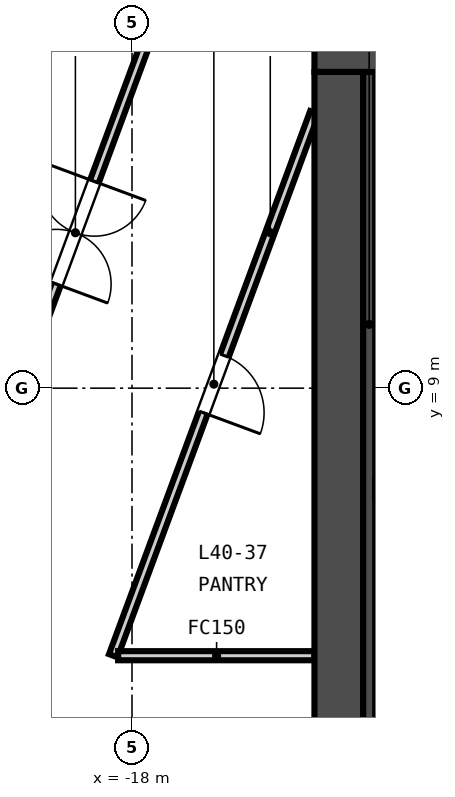
"""IFC4 building model, lengths in metres.
Left out: names, types, materials, properties, quantities, classifications, styles, units other than length and angle.
Written with IfcOpenShell. Run it as: python <this file> out.ifc"""

import sys

from ifc_helpers import new_model, si_unit, direction, frame, frame_2d, origin, place, context, subcontext, project, spatial, rectangle, extrude, element, fill, save


model = new_model("IFC4")
c1 = context("Model", 3, precision=1e-05, world=origin(), true_north=direction((0.0, 1.0)))
c2 = subcontext(c1, "Body", "Model", "MODEL_VIEW")
j1 = project(units=[si_unit("LENGTHUNIT", "METRE"), si_unit("PLANEANGLEUNIT", "RADIAN")], contexts=[c1])
p1 = place(None, origin())
s1 = spatial("IfcSite", under=j1, at=p1, CompositionType="ELEMENT")
p2 = place(p1, origin())
s2 = spatial("IfcBuilding", under=s1, at=p2, CompositionType="ELEMENT")
p3 = place(p2, frame((0.0, 0.0, 162.65)))
s3 = spatial("IfcBuildingStorey", under=s2, at=p3, CompositionType="ELEMENT", Elevation=162.65)
p4 = place(p3, frame((-15.0, 14.6, -0.15), z_axis=(0.0, 0.0, 1.0), x_axis=(1.0, 0.0, 0.0)))
e1 = element("IfcWall", 1, at=p4, inside=s3, PredefinedType="SOLIDWALL", context=c2, shape_type="SweptSolid", body=[
    extrude(rectangle(XDim=30.0, YDim=0.8, at=frame_2d((15.0, 0.0))), origin(), (0.0, 0.0, 1.0), 3.5),
])
p5 = place(p4, frame((9.25, 0.0, 0.15)))
e2 = element("IfcOpeningElement", 2, at=p5, cuts=e1, PredefinedType="OPENING", context=c2, shape_type="SweptSolid", body=[
    extrude(rectangle(XDim=1.5, YDim=2.1, at=frame_2d((0.75, 1.05))), frame((0.0, 0.41, 0.0), z_axis=(0.0, -1.0, 0.0), x_axis=(1.0, 0.0, 0.0)), (0.0, 0.0, 1.0), 0.82),
])
p6 = place(p4, frame((19.4, 0.0, 0.15)))
e3 = element("IfcOpeningElement", 3, at=p6, cuts=e1, PredefinedType="OPENING", context=c2, shape_type="SweptSolid", body=[
    extrude(rectangle(XDim=1.5, YDim=2.1, at=frame_2d((0.75, 1.05))), frame((0.0, 0.41, 0.0), z_axis=(0.0, -1.0, 0.0), x_axis=(1.0, 0.0, 0.0)), (0.0, 0.0, 1.0), 0.82),
])
p7 = place(p4, frame((1.5, 0.0, 0.15)))
e4 = element("IfcOpeningElement", 4, at=p7, cuts=e1, PredefinedType="OPENING", context=c2, shape_type="SweptSolid", body=[
    extrude(rectangle(XDim=1.2, YDim=2.1, at=frame_2d((0.6, 1.05))), frame((0.0, 0.41, 0.0), z_axis=(0.0, -1.0, 0.0), x_axis=(1.0, 0.0, 0.0)), (0.0, 0.0, 1.0), 0.82),
])
p8 = place(p4, frame((27.3, 0.0, 0.15)))
e5 = element("IfcOpeningElement", 5, at=p8, cuts=e1, PredefinedType="OPENING", context=c2, shape_type="SweptSolid", body=[
    extrude(rectangle(XDim=1.2, YDim=2.1, at=frame_2d((0.6, 1.05))), frame((0.0, 0.41, 0.0), z_axis=(0.0, -1.0, 0.0), x_axis=(1.0, 0.0, 0.0)), (0.0, 0.0, 1.0), 0.82),
])
p9 = place(p3, frame((-14.6, 0.8, -0.15), z_axis=(0.0, 0.0, 1.0), x_axis=(0.0, 1.0, 0.0)))
e6 = element("IfcWall", 6, at=p9, inside=s3, PredefinedType="SOLIDWALL", context=c2, shape_type="SweptSolid", body=[
    extrude(rectangle(XDim=13.4, YDim=0.8, at=frame_2d((6.7, 0.0))), origin(), (0.0, 0.0, 1.0), 3.5),
])
p10 = place(p3, frame((-14.1, 0.8, 0.0), z_axis=(0.0, 0.0, 1.0), x_axis=(0.0, 1.0, 0.0)))
e7 = element("IfcWall", 7, at=p10, inside=s3, PredefinedType="SOLIDWALL", context=c2, shape_type="SweptSolid", body=[
    extrude(rectangle(XDim=13.4, YDim=0.2, at=frame_2d((6.7, 0.0))), origin(), (0.0, 0.0, 1.0), 3.35),
])
p11 = place(p3, frame((-15.0, 13.531, 0.0), z_axis=(0.0, 0.0, 1.0), x_axis=(-0.347347751601, -0.937736391241, 0.0)))
e8 = element("IfcWall", 8, at=p11, inside=s3, PredefinedType="PARTITIONING", context=c2, shape_type="SweptSolid", body=[
    extrude(rectangle(XDim=9.524, YDim=0.15, at=frame_2d((4.762, 0.0))), origin(), (0.0, 0.0, 1.0), 2.591),
])
p12 = place(p11, frame((4.262, 0.0, 0.0)))
e9 = element("IfcOpeningElement", 9, at=p12, cuts=e8, PredefinedType="OPENING", context=c2, shape_type="SweptSolid", body=[
    extrude(rectangle(XDim=1.0, YDim=2.1, at=frame_2d((0.5, 1.05))), frame((0.0, 0.085, 0.0), z_axis=(0.0, -1.0, 0.0), x_axis=(1.0, 0.0, 0.0)), (0.0, 0.0, 1.0), 0.17),
])
p13 = place(p3, frame((-21.318, 5.111, 0.0), z_axis=(0.0, 0.0, 1.0), x_axis=(0.347346173898, 0.937736975638, 0.0)))
e10 = element("IfcWall", 10, at=p13, inside=s3, PredefinedType="PARTITIONING", context=c2, shape_type="SweptSolid", body=[
    extrude(rectangle(XDim=13.745, YDim=0.15, at=frame_2d((6.872, 0.0))), origin(), (0.0, 0.0, 1.0), 2.591),
])
p14 = place(p13, frame((5.972, 0.0, 0.0)))
e11 = element("IfcOpeningElement", 11, at=p14, cuts=e10, PredefinedType="OPENING", context=c2, shape_type="SweptSolid", body=[
    extrude(rectangle(XDim=1.8, YDim=2.1, at=frame_2d((0.9, 1.05))), frame((0.0, 0.085, 0.0), z_axis=(0.0, -1.0, 0.0), x_axis=(1.0, 0.0, 0.0)), (0.0, 0.0, 1.0), 0.17),
])
p15 = place(p3, frame((-18.228, 4.6, 0.0), z_axis=(0.0, 0.0, 1.0), x_axis=(1.0, 0.0, 0.0)))
e12 = element("IfcWall", 12, at=p15, inside=s3, PredefinedType="PARTITIONING", context=c2, shape_type="SweptSolid", body=[
    extrude(rectangle(XDim=3.228, YDim=0.15, at=frame_2d((1.614, 0.0))), origin(), (0.0, 0.0, 1.0), 2.591),
])
p16 = place(p14, origin())
e13 = element("IfcDoor", 13, at=p16, inside=s3, OperationType="DOUBLE_DOOR_DOUBLE_SWING", PredefinedType="DOOR", context=c2, shape_type="SweptSolid", body=[
    extrude(rectangle(XDim=1.8, YDim=2.1, at=frame_2d((0.9, 1.05))), frame((0.0, 0.025, 0.0), z_axis=(0.0, -1.0, 0.0), x_axis=(1.0, 0.0, 0.0)), (0.0, 0.0, 1.0), 0.05),
])
fill(e11, e13)
p17 = place(p12, origin())
e14 = element("IfcDoor", 14, at=p17, inside=s3, OperationType="SINGLE_SWING_RIGHT", PredefinedType="DOOR", context=c2, shape_type="SweptSolid", body=[
    extrude(rectangle(XDim=1.0, YDim=2.1, at=frame_2d((0.5, 1.05))), frame((0.0, 0.025, 0.0), z_axis=(0.0, -1.0, 0.0), x_axis=(1.0, 0.0, 0.0)), (0.0, 0.0, 1.0), 0.05),
])
fill(e9, e14)
save(model, sys.argv[1])
